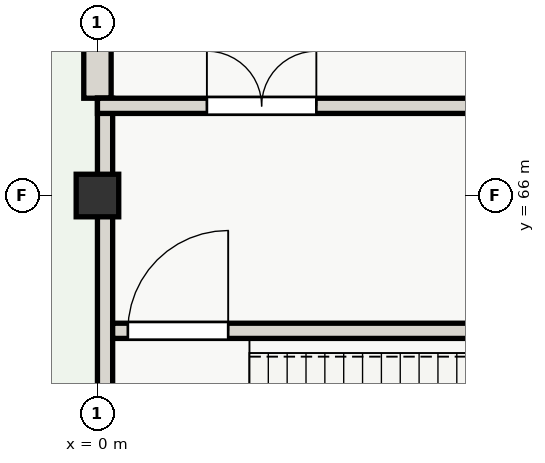
"""IFC4 building model, lengths in metres.
Left out: names, types, materials, properties, quantities, classifications, styles, units other than length and angle.
Written with IfcOpenShell. Run it as: python <this file> out.ifc"""

import sys

from ifc_helpers import new_model, si_unit, direction, frame, frame_2d, origin, origin_2d, place, context, subcontext, project, spatial, rectangle, extrude, element, fill, save


model = new_model("IFC4")
c1 = context("Model", 3, precision=1e-05, world=origin(), true_north=direction((0.0, 1.0)))
c2 = subcontext(c1, "Body", "Model", "MODEL_VIEW")
j1 = project(units=[si_unit("LENGTHUNIT", "METRE"), si_unit("PLANEANGLEUNIT", "RADIAN")], contexts=[c1])
p1 = place(None, origin())
s1 = spatial("IfcSite", under=j1, at=p1, CompositionType="ELEMENT")
p2 = place(p1, origin())
s2 = spatial("IfcBuilding", under=s1, at=p2, CompositionType="ELEMENT")
p3 = place(p2, origin())
s3 = spatial("IfcBuildingStorey", under=s2, at=p3, CompositionType="ELEMENT", Elevation=0.0)
p4 = place(p3, frame((0.0, 66.0, 0.0), z_axis=(0.0, 0.0, 1.0), x_axis=(1.0, 0.0, 0.0)))
e1 = element("IfcColumn", 1, at=p4, inside=s3, PredefinedType="COLUMN", context=c2, shape_type="SweptSolid", body=[
    extrude(rectangle(XDim=0.7, YDim=0.7, at=origin_2d()), origin(), (0.0, 0.0, 1.0), 4.2),
])
p5 = place(p3, frame((0.0, 67.6, 0.0), z_axis=(0.0, 0.0, 1.0), x_axis=(0.0, 1.0, 0.0)))
e2 = element("IfcWall", 2, at=p5, inside=s3, PredefinedType="SOLIDWALL", context=c2, shape_type="SweptSolid", body=[
    extrude(rectangle(XDim=4.4, YDim=0.45, at=frame_2d((2.2, 0.0))), origin(), (0.0, 0.0, 1.0), 3.55),
])
p6 = place(p5, frame((1.4, 0.0, 0.9)))
e3 = element("IfcOpeningElement", 3, at=p6, cuts=e2, PredefinedType="OPENING", context=c2, shape_type="SweptSolid", body=[
    extrude(rectangle(XDim=1.6, YDim=2.0, at=frame_2d((0.8, 1.0))), frame((0.0, 0.235, 0.0), z_axis=(0.0, -1.0, 0.0), x_axis=(1.0, 0.0, 0.0)), (0.0, 0.0, 1.0), 0.47),
])
p7 = place(p3, frame((0.125, 58.4, 0.0), z_axis=(0.0, 0.0, 1.0), x_axis=(0.0, 1.0, 0.0)))
e4 = element("IfcWall", 4, at=p7, inside=s3, PredefinedType="SHEAR", context=c2, shape_type="SweptSolid", body=[
    extrude(rectangle(XDim=9.2, YDim=0.25, at=frame_2d((4.6, 0.0))), origin(), (0.0, 0.0, 1.0), 4.2),
])
p8 = place(p7, frame((1.4, 0.0, 0.0)))
e5 = element("IfcOpeningElement", 5, at=p8, cuts=e4, PredefinedType="OPENING", context=c2, shape_type="SweptSolid", body=[
    extrude(rectangle(XDim=1.9, YDim=2.2, at=frame_2d((0.95, 1.1))), frame((0.0, 0.135, 0.0), z_axis=(0.0, -1.0, 0.0), x_axis=(1.0, 0.0, 0.0)), (0.0, 0.0, 1.0), 0.27),
])
p9 = place(p3, frame((0.0, 67.475, 0.0), z_axis=(0.0, 0.0, 1.0), x_axis=(1.0, 0.0, 0.0)))
e6 = element("IfcWall", 6, at=p9, inside=s3, PredefinedType="SHEAR", context=c2, shape_type="SweptSolid", body=[
    extrude(rectangle(XDim=9.2, YDim=0.25, at=frame_2d((4.6, 0.0))), origin(), (0.0, 0.0, 1.0), 4.2),
])
p10 = place(p9, frame((1.8, 0.0, 0.0)))
e7 = element("IfcOpeningElement", 7, at=p10, cuts=e6, PredefinedType="OPENING", context=c2, shape_type="SweptSolid", body=[
    extrude(rectangle(XDim=1.8, YDim=2.15, at=frame_2d((0.9, 1.075))), frame((0.0, 0.135, 0.0), z_axis=(0.0, -1.0, 0.0), x_axis=(1.0, 0.0, 0.0)), (0.0, 0.0, 1.0), 0.27),
])
p11 = place(p3, frame((0.25, 63.775, 0.0), z_axis=(0.0, 0.0, 1.0), x_axis=(1.0, 0.0, 0.0)))
e8 = element("IfcWall", 8, at=p11, inside=s3, PredefinedType="SHEAR", context=c2, shape_type="SweptSolid", body=[
    extrude(rectangle(XDim=8.7, YDim=0.25, at=frame_2d((4.35, 0.0))), origin(), (0.0, 0.0, 1.0), 4.2),
])
p12 = place(p11, frame((0.25, 0.0, 0.0)))
e9 = element("IfcOpeningElement", 9, at=p12, cuts=e8, PredefinedType="OPENING", context=c2, shape_type="SweptSolid", body=[
    extrude(rectangle(XDim=1.65, YDim=2.1, at=frame_2d((0.825, 1.05))), frame((0.0, 0.135, 0.0), z_axis=(0.0, -1.0, 0.0), x_axis=(1.0, 0.0, 0.0)), (0.0, 0.0, 1.0), 0.27),
])
p13 = place(p10, origin())
e10 = element("IfcDoor", 10, at=p13, inside=s3, OperationType="DOUBLE_DOOR_SINGLE_SWING", PredefinedType="DOOR", context=c2, shape_type="SweptSolid", body=[
    extrude(rectangle(XDim=1.8, YDim=2.15, at=frame_2d((0.9, 1.075))), frame((0.0, 0.025, 0.0), z_axis=(0.0, -1.0, 0.0), x_axis=(1.0, 0.0, 0.0)), (0.0, 0.0, 1.0), 0.05),
])
fill(e7, e10)
p14 = place(p12, origin())
e11 = element("IfcDoor", 11, at=p14, inside=s3, OperationType="SINGLE_SWING_RIGHT", PredefinedType="DOOR", context=c2, shape_type="SweptSolid", body=[
    extrude(rectangle(XDim=1.65, YDim=2.1, at=frame_2d((0.825, 1.05))), frame((0.0, 0.025, 0.0), z_axis=(0.0, -1.0, 0.0), x_axis=(1.0, 0.0, 0.0)), (0.0, 0.0, 1.0), 0.05),
])
fill(e9, e11)
save(model, sys.argv[1])
